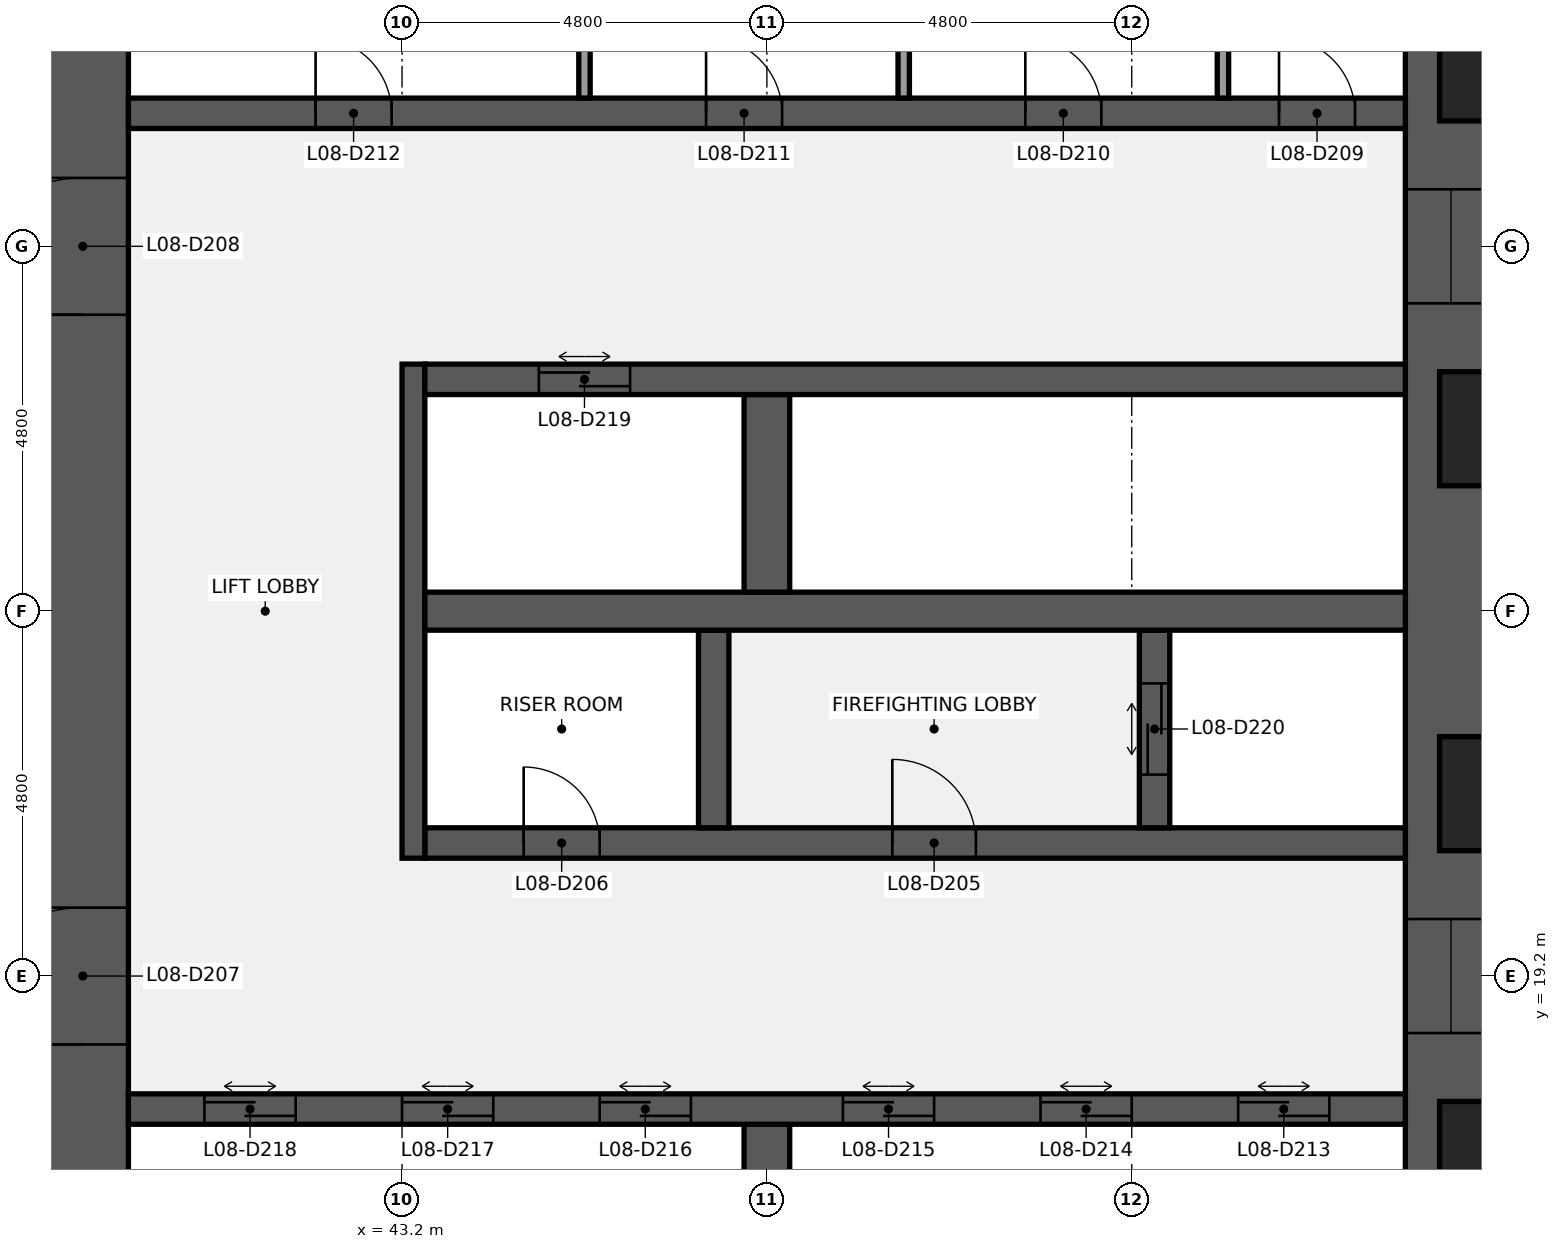
"""IFC4 building model, lengths in metres.
Left out: names, types, materials, properties, quantities, classifications, styles, units other than length and angle.
Written with IfcOpenShell. Run it as: python <this file> out.ifc"""

import sys

from ifc_helpers import new_model, si_unit, direction, frame, frame_2d, origin, place, context, subcontext, project, spatial, rectangle, extrude, element, fill, save


model = new_model("IFC4")
c1 = context("Model", 3, precision=1e-05, world=origin(), true_north=direction((0.0, 1.0)))
c2 = subcontext(c1, "Body", "Model", "MODEL_VIEW")
j1 = project(units=[si_unit("LENGTHUNIT", "METRE"), si_unit("PLANEANGLEUNIT", "RADIAN")], contexts=[c1])
p1 = place(None, origin())
s1 = spatial("IfcSite", under=j1, at=p1, CompositionType="ELEMENT")
p2 = place(p1, origin())
s2 = spatial("IfcBuilding", under=s1, at=p2, CompositionType="ELEMENT")
p3 = place(p2, frame((0.0, 0.0, 43.0)))
s3 = spatial("IfcBuildingStorey", under=s2, at=p3, CompositionType="ELEMENT", Elevation=43.0)
p4 = place(p3, frame((57.0, 38.4, 0.0), z_axis=(0.0, 0.0, 1.0), x_axis=(0.0, -1.0, 0.0)))
e1 = element("IfcWall", 1, at=p4, inside=s3, PredefinedType="SHEAR", context=c2, shape_type="SweptSolid", body=[
    extrude(rectangle(XDim=28.8, YDim=1.2, at=frame_2d((14.4, 0.0))), origin(), (0.0, 0.0, 1.0), 3.84),
])
p5 = place(p4, frame((18.45, 0.0, 0.9)))
e2 = element("IfcOpeningElement", 2, at=p5, cuts=e1, PredefinedType="OPENING", context=c2, shape_type="SweptSolid", body=[
    extrude(rectangle(XDim=1.5, YDim=1.5, at=frame_2d((0.75, 0.75))), frame((0.0, 0.61, 0.0), z_axis=(0.0, -1.0, 0.0), x_axis=(1.0, 0.0, 0.0)), (0.0, 0.0, 1.0), 1.22),
])
p6 = place(p4, frame((8.85, 0.0, 0.9)))
e3 = element("IfcOpeningElement", 3, at=p6, cuts=e1, PredefinedType="OPENING", context=c2, shape_type="SweptSolid", body=[
    extrude(rectangle(XDim=1.5, YDim=1.5, at=frame_2d((0.75, 0.75))), frame((0.0, 0.61, 0.0), z_axis=(0.0, -1.0, 0.0), x_axis=(1.0, 0.0, 0.0)), (0.0, 0.0, 1.0), 1.22),
])
p7 = place(p3, frame((39.0, 9.6, 0.0), z_axis=(0.0, 0.0, 1.0), x_axis=(0.0, 1.0, 0.0)))
e4 = element("IfcWall", 4, at=p7, inside=s3, PredefinedType="SHEAR", context=c2, shape_type="SweptSolid", body=[
    extrude(rectangle(XDim=28.8, YDim=1.2, at=frame_2d((14.4, 0.0))), origin(), (0.0, 0.0, 1.0), 3.84),
])
p8 = place(p7, frame((8.7, 0.0, 0.0)))
e5 = element("IfcOpeningElement", 5, at=p8, cuts=e4, PredefinedType="OPENING", context=c2, shape_type="SweptSolid", body=[
    extrude(rectangle(XDim=1.8, YDim=2.1, at=frame_2d((0.9, 1.05))), frame((0.0, 0.61, 0.0), z_axis=(0.0, -1.0, 0.0), x_axis=(1.0, 0.0, 0.0)), (0.0, 0.0, 1.0), 1.22),
])
p9 = place(p7, frame((18.3, 0.0, 0.0)))
e6 = element("IfcOpeningElement", 6, at=p9, cuts=e4, PredefinedType="OPENING", context=c2, shape_type="SweptSolid", body=[
    extrude(rectangle(XDim=1.8, YDim=2.1, at=frame_2d((0.9, 1.05))), frame((0.0, 0.61, 0.0), z_axis=(0.0, -1.0, 0.0), x_axis=(1.0, 0.0, 0.0)), (0.0, 0.0, 1.0), 1.22),
])
p10 = place(p3, frame((48.0, 14.65, 0.0), z_axis=(0.0, 0.0, 1.0), x_axis=(0.0, 1.0, 0.0)))
e7 = element("IfcWall", 7, at=p10, inside=s3, PredefinedType="SHEAR", context=c2, shape_type="SweptSolid", body=[
    extrude(rectangle(XDim=2.6, YDim=0.6, at=frame_2d((1.3, 0.0))), origin(), (0.0, 0.0, 1.0), 3.84),
])
p11 = place(p3, frame((39.6, 17.45, 0.0), z_axis=(0.0, 0.0, 1.0), x_axis=(1.0, 0.0, 0.0)))
e8 = element("IfcWall", 8, at=p11, inside=s3, PredefinedType="SHEAR", context=c2, shape_type="SweptSolid", body=[
    extrude(rectangle(XDim=16.8, YDim=0.4, at=frame_2d((8.4, 0.0))), origin(), (0.0, 0.0, 1.0), 3.84),
])
p12 = place(p11, frame((14.6, 0.0, 0.0)))
e9 = element("IfcOpeningElement", 9, at=p12, cuts=e8, PredefinedType="OPENING", context=c2, shape_type="SweptSolid", body=[
    extrude(rectangle(XDim=1.2, YDim=2.1, at=frame_2d((0.6, 1.05))), frame((0.0, 0.21, 0.0), z_axis=(0.0, -1.0, 0.0), x_axis=(1.0, 0.0, 0.0)), (0.0, 0.0, 1.0), 0.42),
])
p13 = place(p11, frame((12.0, 0.0, 0.0)))
e10 = element("IfcOpeningElement", 10, at=p13, cuts=e8, PredefinedType="OPENING", context=c2, shape_type="SweptSolid", body=[
    extrude(rectangle(XDim=1.2, YDim=2.1, at=frame_2d((0.6, 1.05))), frame((0.0, 0.21, 0.0), z_axis=(0.0, -1.0, 0.0), x_axis=(1.0, 0.0, 0.0)), (0.0, 0.0, 1.0), 0.42),
])
p14 = place(p11, frame((9.4, 0.0, 0.0)))
e11 = element("IfcOpeningElement", 11, at=p14, cuts=e8, PredefinedType="OPENING", context=c2, shape_type="SweptSolid", body=[
    extrude(rectangle(XDim=1.2, YDim=2.1, at=frame_2d((0.6, 1.05))), frame((0.0, 0.21, 0.0), z_axis=(0.0, -1.0, 0.0), x_axis=(1.0, 0.0, 0.0)), (0.0, 0.0, 1.0), 0.42),
])
p15 = place(p11, frame((6.2, 0.0, 0.0)))
e12 = element("IfcOpeningElement", 12, at=p15, cuts=e8, PredefinedType="OPENING", context=c2, shape_type="SweptSolid", body=[
    extrude(rectangle(XDim=1.2, YDim=2.1, at=frame_2d((0.6, 1.05))), frame((0.0, 0.21, 0.0), z_axis=(0.0, -1.0, 0.0), x_axis=(1.0, 0.0, 0.0)), (0.0, 0.0, 1.0), 0.42),
])
p16 = place(p11, frame((3.6, 0.0, 0.0)))
e13 = element("IfcOpeningElement", 13, at=p16, cuts=e8, PredefinedType="OPENING", context=c2, shape_type="SweptSolid", body=[
    extrude(rectangle(XDim=1.2, YDim=2.1, at=frame_2d((0.6, 1.05))), frame((0.0, 0.21, 0.0), z_axis=(0.0, -1.0, 0.0), x_axis=(1.0, 0.0, 0.0)), (0.0, 0.0, 1.0), 0.42),
])
p17 = place(p11, frame((1.0, 0.0, 0.0)))
e14 = element("IfcOpeningElement", 14, at=p17, cuts=e8, PredefinedType="OPENING", context=c2, shape_type="SweptSolid", body=[
    extrude(rectangle(XDim=1.2, YDim=2.1, at=frame_2d((0.6, 1.05))), frame((0.0, 0.21, 0.0), z_axis=(0.0, -1.0, 0.0), x_axis=(1.0, 0.0, 0.0)), (0.0, 0.0, 1.0), 0.42),
])
p18 = place(p3, frame((43.5, 20.95, 0.0), z_axis=(0.0, 0.0, 1.0), x_axis=(1.0, 0.0, 0.0)))
e15 = element("IfcWall", 15, at=p18, inside=s3, PredefinedType="SHEAR", context=c2, shape_type="SweptSolid", body=[
    extrude(rectangle(XDim=12.9, YDim=0.4, at=frame_2d((6.45, 0.0))), origin(), (0.0, 0.0, 1.0), 3.84),
])
p19 = place(p18, frame((6.15, 0.0, 0.0)))
e16 = element("IfcOpeningElement", 16, at=p19, cuts=e15, PredefinedType="OPENING", context=c2, shape_type="SweptSolid", body=[
    extrude(rectangle(XDim=1.1, YDim=2.1, at=frame_2d((0.55, 1.05))), frame((0.0, 0.21, 0.0), z_axis=(0.0, -1.0, 0.0), x_axis=(1.0, 0.0, 0.0)), (0.0, 0.0, 1.0), 0.42),
])
p20 = place(p18, frame((1.3, 0.0, 0.0)))
e17 = element("IfcOpeningElement", 17, at=p20, cuts=e15, PredefinedType="OPENING", context=c2, shape_type="SweptSolid", body=[
    extrude(rectangle(XDim=1.0, YDim=2.1, at=frame_2d((0.5, 1.05))), frame((0.0, 0.21, 0.0), z_axis=(0.0, -1.0, 0.0), x_axis=(1.0, 0.0, 0.0)), (0.0, 0.0, 1.0), 0.42),
])
p21 = place(p3, frame((43.35, 20.75, 0.0), z_axis=(0.0, 0.0, 1.0), x_axis=(0.0, 1.0, 0.0)))
e18 = element("IfcWall", 18, at=p21, inside=s3, PredefinedType="SHEAR", context=c2, shape_type="SweptSolid", body=[
    extrude(rectangle(XDim=6.5, YDim=0.3, at=frame_2d((3.25, 0.0))), origin(), (0.0, 0.0, 1.0), 3.84),
])
p22 = place(p3, frame((53.1, 21.15, 0.0), z_axis=(0.0, 0.0, 1.0), x_axis=(0.0, 1.0, 0.0)))
e19 = element("IfcWall", 19, at=p22, inside=s3, PredefinedType="SHEAR", context=c2, shape_type="SweptSolid", body=[
    extrude(rectangle(XDim=2.6, YDim=0.4, at=frame_2d((1.3, 0.0))), origin(), (0.0, 0.0, 1.0), 3.84),
])
p23 = place(p22, frame((0.7, 0.0, 0.0)))
e20 = element("IfcOpeningElement", 20, at=p23, cuts=e19, PredefinedType="OPENING", context=c2, shape_type="SweptSolid", body=[
    extrude(rectangle(XDim=1.2, YDim=2.1, at=frame_2d((0.6, 1.05))), frame((0.0, 0.21, 0.0), z_axis=(0.0, -1.0, 0.0), x_axis=(1.0, 0.0, 0.0)), (0.0, 0.0, 1.0), 0.42),
])
p24 = place(p3, frame((47.3, 21.15, 0.0), z_axis=(0.0, 0.0, 1.0), x_axis=(0.0, 1.0, 0.0)))
e21 = element("IfcWall", 21, at=p24, inside=s3, PredefinedType="SHEAR", context=c2, shape_type="SweptSolid", body=[
    extrude(rectangle(XDim=2.6, YDim=0.4, at=frame_2d((1.3, 0.0))), origin(), (0.0, 0.0, 1.0), 3.84),
])
p25 = place(p3, frame((43.5, 24.0, 0.0), z_axis=(0.0, 0.0, 1.0), x_axis=(1.0, 0.0, 0.0)))
e22 = element("IfcWall", 22, at=p25, inside=s3, PredefinedType="SHEAR", context=c2, shape_type="SweptSolid", body=[
    extrude(rectangle(XDim=12.9, YDim=0.5, at=frame_2d((6.45, 0.0))), origin(), (0.0, 0.0, 1.0), 3.84),
])
p26 = place(p3, frame((48.0, 24.25, 0.0), z_axis=(0.0, 0.0, 1.0), x_axis=(0.0, 1.0, 0.0)))
e23 = element("IfcWall", 23, at=p26, inside=s3, PredefinedType="SHEAR", context=c2, shape_type="SweptSolid", body=[
    extrude(rectangle(XDim=2.6, YDim=0.6, at=frame_2d((1.3, 0.0))), origin(), (0.0, 0.0, 1.0), 3.84),
])
p27 = place(p3, frame((43.5, 27.05, 0.0), z_axis=(0.0, 0.0, 1.0), x_axis=(1.0, 0.0, 0.0)))
e24 = element("IfcWall", 24, at=p27, inside=s3, PredefinedType="SHEAR", context=c2, shape_type="SweptSolid", body=[
    extrude(rectangle(XDim=12.9, YDim=0.4, at=frame_2d((6.45, 0.0))), origin(), (0.0, 0.0, 1.0), 3.84),
])
p28 = place(p27, frame((1.5, 0.0, 0.0)))
e25 = element("IfcOpeningElement", 25, at=p28, cuts=e24, PredefinedType="OPENING", context=c2, shape_type="SweptSolid", body=[
    extrude(rectangle(XDim=1.2, YDim=2.1, at=frame_2d((0.6, 1.05))), frame((0.0, 0.21, 0.0), z_axis=(0.0, -1.0, 0.0), x_axis=(1.0, 0.0, 0.0)), (0.0, 0.0, 1.0), 0.42),
])
p29 = place(p3, frame((39.6, 30.55, 0.0), z_axis=(0.0, 0.0, 1.0), x_axis=(1.0, 0.0, 0.0)))
e26 = element("IfcWall", 26, at=p29, inside=s3, PredefinedType="SHEAR", context=c2, shape_type="SweptSolid", body=[
    extrude(rectangle(XDim=16.8, YDim=0.4, at=frame_2d((8.4, 0.0))), origin(), (0.0, 0.0, 1.0), 3.84),
])
p30 = place(p29, frame((15.137, 0.0, 0.0)))
e27 = element("IfcOpeningElement", 27, at=p30, cuts=e26, PredefinedType="OPENING", context=c2, shape_type="SweptSolid", body=[
    extrude(rectangle(XDim=1.0, YDim=2.1, at=frame_2d((0.5, 1.05))), frame((0.0, 0.21, 0.0), z_axis=(0.0, -1.0, 0.0), x_axis=(1.0, 0.0, 0.0)), (0.0, 0.0, 1.0), 0.42),
])
p31 = place(p29, frame((11.8, 0.0, 0.0)))
e28 = element("IfcOpeningElement", 28, at=p31, cuts=e26, PredefinedType="OPENING", context=c2, shape_type="SweptSolid", body=[
    extrude(rectangle(XDim=1.0, YDim=2.1, at=frame_2d((0.5, 1.05))), frame((0.0, 0.21, 0.0), z_axis=(0.0, -1.0, 0.0), x_axis=(1.0, 0.0, 0.0)), (0.0, 0.0, 1.0), 0.42),
])
p32 = place(p29, frame((7.6, 0.0, 0.0)))
e29 = element("IfcOpeningElement", 29, at=p32, cuts=e26, PredefinedType="OPENING", context=c2, shape_type="SweptSolid", body=[
    extrude(rectangle(XDim=1.0, YDim=2.1, at=frame_2d((0.5, 1.05))), frame((0.0, 0.21, 0.0), z_axis=(0.0, -1.0, 0.0), x_axis=(1.0, 0.0, 0.0)), (0.0, 0.0, 1.0), 0.42),
])
p33 = place(p29, frame((2.462, 0.0, 0.0)))
e30 = element("IfcOpeningElement", 30, at=p33, cuts=e26, PredefinedType="OPENING", context=c2, shape_type="SweptSolid", body=[
    extrude(rectangle(XDim=1.0, YDim=2.1, at=frame_2d((0.5, 1.05))), frame((0.0, 0.21, 0.0), z_axis=(0.0, -1.0, 0.0), x_axis=(1.0, 0.0, 0.0)), (0.0, 0.0, 1.0), 0.42),
])
for number, where, z_axis, x_axis in (
    (31, (54.0, 30.75, 0.0), (0.0, 0.0, 1.0), (0.0, 1.0, 0.0)),
    (32, (49.8, 30.75, 0.0), (0.0, 0.0, 1.0), (0.0, 1.0, 0.0)),
    (33, (45.6, 30.75, 0.0), (0.0, 0.0, 1.0), (0.0, 1.0, 0.0)),
):
    element("IfcWall", number, at=place(p3, frame(where, z_axis=z_axis, x_axis=x_axis)), inside=s3, PredefinedType="PARTITIONING", context=c2, shape_type="SweptSolid", body=[
        extrude(rectangle(XDim=2.6, YDim=0.15, at=frame_2d((1.3, 0.0))), origin(), (0.0, 0.0, 1.0), 3.84),
    ])
p34 = place(p19, origin())
e34 = element("IfcDoor", 34, at=p34, inside=s3, OperationType="SINGLE_SWING_LEFT", PredefinedType="DOOR", context=c2, shape_type="SweptSolid", body=[
    extrude(rectangle(XDim=1.1, YDim=2.1, at=frame_2d((0.55, 1.05))), frame((0.0, 0.025, 0.0), z_axis=(0.0, -1.0, 0.0), x_axis=(1.0, 0.0, 0.0)), (0.0, 0.0, 1.0), 0.05),
])
fill(e16, e34)
p35 = place(p20, origin())
e35 = element("IfcDoor", 35, at=p35, inside=s3, OperationType="SINGLE_SWING_LEFT", PredefinedType="DOOR", context=c2, shape_type="SweptSolid", body=[
    extrude(rectangle(XDim=1.0, YDim=2.1, at=frame_2d((0.5, 1.05))), frame((0.0, 0.025, 0.0), z_axis=(0.0, -1.0, 0.0), x_axis=(1.0, 0.0, 0.0)), (0.0, 0.0, 1.0), 0.05),
])
fill(e17, e35)
p36 = place(p8, origin())
e36 = element("IfcDoor", 36, at=p36, inside=s3, OperationType="DOUBLE_DOOR_SINGLE_SWING", PredefinedType="DOOR", context=c2, shape_type="SweptSolid", body=[
    extrude(rectangle(XDim=1.8, YDim=2.1, at=frame_2d((0.9, 1.05))), frame((0.0, 0.025, 0.0), z_axis=(0.0, -1.0, 0.0), x_axis=(1.0, 0.0, 0.0)), (0.0, 0.0, 1.0), 0.05),
])
fill(e5, e36)
p37 = place(p9, origin())
e37 = element("IfcDoor", 37, at=p37, inside=s3, OperationType="DOUBLE_DOOR_SINGLE_SWING", PredefinedType="DOOR", context=c2, shape_type="SweptSolid", body=[
    extrude(rectangle(XDim=1.8, YDim=2.1, at=frame_2d((0.9, 1.05))), frame((0.0, 0.025, 0.0), z_axis=(0.0, -1.0, 0.0), x_axis=(1.0, 0.0, 0.0)), (0.0, 0.0, 1.0), 0.05),
])
fill(e6, e37)
p38 = place(p30, origin())
e38 = element("IfcDoor", 38, at=p38, inside=s3, OperationType="SINGLE_SWING_LEFT", PredefinedType="DOOR", context=c2, shape_type="SweptSolid", body=[
    extrude(rectangle(XDim=1.0, YDim=2.1, at=frame_2d((0.5, 1.05))), frame((0.0, 0.025, 0.0), z_axis=(0.0, -1.0, 0.0), x_axis=(1.0, 0.0, 0.0)), (0.0, 0.0, 1.0), 0.05),
])
fill(e27, e38)
p39 = place(p31, origin())
e39 = element("IfcDoor", 39, at=p39, inside=s3, OperationType="SINGLE_SWING_LEFT", PredefinedType="DOOR", context=c2, shape_type="SweptSolid", body=[
    extrude(rectangle(XDim=1.0, YDim=2.1, at=frame_2d((0.5, 1.05))), frame((0.0, 0.025, 0.0), z_axis=(0.0, -1.0, 0.0), x_axis=(1.0, 0.0, 0.0)), (0.0, 0.0, 1.0), 0.05),
])
fill(e28, e39)
p40 = place(p32, origin())
e40 = element("IfcDoor", 40, at=p40, inside=s3, OperationType="SINGLE_SWING_LEFT", PredefinedType="DOOR", context=c2, shape_type="SweptSolid", body=[
    extrude(rectangle(XDim=1.0, YDim=2.1, at=frame_2d((0.5, 1.05))), frame((0.0, 0.025, 0.0), z_axis=(0.0, -1.0, 0.0), x_axis=(1.0, 0.0, 0.0)), (0.0, 0.0, 1.0), 0.05),
])
fill(e29, e40)
p41 = place(p33, origin())
e41 = element("IfcDoor", 41, at=p41, inside=s3, OperationType="SINGLE_SWING_LEFT", PredefinedType="DOOR", context=c2, shape_type="SweptSolid", body=[
    extrude(rectangle(XDim=1.0, YDim=2.1, at=frame_2d((0.5, 1.05))), frame((0.0, 0.025, 0.0), z_axis=(0.0, -1.0, 0.0), x_axis=(1.0, 0.0, 0.0)), (0.0, 0.0, 1.0), 0.05),
])
fill(e30, e41)
p42 = place(p12, origin())
e42 = element("IfcDoor", 42, at=p42, inside=s3, OperationType="DOUBLE_DOOR_SLIDING", PredefinedType="DOOR", context=c2, shape_type="SweptSolid", body=[
    extrude(rectangle(XDim=1.2, YDim=2.1, at=frame_2d((0.6, 1.05))), frame((0.0, 0.025, 0.0), z_axis=(0.0, -1.0, 0.0), x_axis=(1.0, 0.0, 0.0)), (0.0, 0.0, 1.0), 0.05),
])
fill(e9, e42)
p43 = place(p13, origin())
e43 = element("IfcDoor", 43, at=p43, inside=s3, OperationType="DOUBLE_DOOR_SLIDING", PredefinedType="DOOR", context=c2, shape_type="SweptSolid", body=[
    extrude(rectangle(XDim=1.2, YDim=2.1, at=frame_2d((0.6, 1.05))), frame((0.0, 0.025, 0.0), z_axis=(0.0, -1.0, 0.0), x_axis=(1.0, 0.0, 0.0)), (0.0, 0.0, 1.0), 0.05),
])
fill(e10, e43)
p44 = place(p14, origin())
e44 = element("IfcDoor", 44, at=p44, inside=s3, OperationType="DOUBLE_DOOR_SLIDING", PredefinedType="DOOR", context=c2, shape_type="SweptSolid", body=[
    extrude(rectangle(XDim=1.2, YDim=2.1, at=frame_2d((0.6, 1.05))), frame((0.0, 0.025, 0.0), z_axis=(0.0, -1.0, 0.0), x_axis=(1.0, 0.0, 0.0)), (0.0, 0.0, 1.0), 0.05),
])
fill(e11, e44)
p45 = place(p15, origin())
e45 = element("IfcDoor", 45, at=p45, inside=s3, OperationType="DOUBLE_DOOR_SLIDING", PredefinedType="DOOR", context=c2, shape_type="SweptSolid", body=[
    extrude(rectangle(XDim=1.2, YDim=2.1, at=frame_2d((0.6, 1.05))), frame((0.0, 0.025, 0.0), z_axis=(0.0, -1.0, 0.0), x_axis=(1.0, 0.0, 0.0)), (0.0, 0.0, 1.0), 0.05),
])
fill(e12, e45)
p46 = place(p16, origin())
e46 = element("IfcDoor", 46, at=p46, inside=s3, OperationType="DOUBLE_DOOR_SLIDING", PredefinedType="DOOR", context=c2, shape_type="SweptSolid", body=[
    extrude(rectangle(XDim=1.2, YDim=2.1, at=frame_2d((0.6, 1.05))), frame((0.0, 0.025, 0.0), z_axis=(0.0, -1.0, 0.0), x_axis=(1.0, 0.0, 0.0)), (0.0, 0.0, 1.0), 0.05),
])
fill(e13, e46)
p47 = place(p17, origin())
e47 = element("IfcDoor", 47, at=p47, inside=s3, OperationType="DOUBLE_DOOR_SLIDING", PredefinedType="DOOR", context=c2, shape_type="SweptSolid", body=[
    extrude(rectangle(XDim=1.2, YDim=2.1, at=frame_2d((0.6, 1.05))), frame((0.0, 0.025, 0.0), z_axis=(0.0, -1.0, 0.0), x_axis=(1.0, 0.0, 0.0)), (0.0, 0.0, 1.0), 0.05),
])
fill(e14, e47)
p48 = place(p28, origin())
e48 = element("IfcDoor", 48, at=p48, inside=s3, OperationType="DOUBLE_DOOR_SLIDING", PredefinedType="DOOR", context=c2, shape_type="SweptSolid", body=[
    extrude(rectangle(XDim=1.2, YDim=2.1, at=frame_2d((0.6, 1.05))), frame((0.0, 0.025, 0.0), z_axis=(0.0, -1.0, 0.0), x_axis=(1.0, 0.0, 0.0)), (0.0, 0.0, 1.0), 0.05),
])
fill(e25, e48)
p49 = place(p23, origin())
e49 = element("IfcDoor", 49, at=p49, inside=s3, OperationType="DOUBLE_DOOR_SLIDING", PredefinedType="DOOR", context=c2, shape_type="SweptSolid", body=[
    extrude(rectangle(XDim=1.2, YDim=2.1, at=frame_2d((0.6, 1.05))), frame((0.0, 0.025, 0.0), z_axis=(0.0, -1.0, 0.0), x_axis=(1.0, 0.0, 0.0)), (0.0, 0.0, 1.0), 0.05),
])
fill(e20, e49)
p50 = place(p5, origin())
e50 = element("IfcWindow", 50, at=p50, inside=s3, PartitioningType="SINGLE_PANEL", PredefinedType="WINDOW", context=c2, shape_type="SweptSolid", body=[
    extrude(rectangle(XDim=1.5, YDim=1.5, at=frame_2d((0.75, 0.75))), frame((0.0, 0.03, 0.0), z_axis=(0.0, -1.0, 0.0), x_axis=(1.0, 0.0, 0.0)), (0.0, 0.0, 1.0), 0.06),
])
fill(e2, e50)
p51 = place(p6, origin())
e51 = element("IfcWindow", 51, at=p51, inside=s3, PartitioningType="SINGLE_PANEL", PredefinedType="WINDOW", context=c2, shape_type="SweptSolid", body=[
    extrude(rectangle(XDim=1.5, YDim=1.5, at=frame_2d((0.75, 0.75))), frame((0.0, 0.03, 0.0), z_axis=(0.0, -1.0, 0.0), x_axis=(1.0, 0.0, 0.0)), (0.0, 0.0, 1.0), 0.06),
])
fill(e3, e51)
save(model, sys.argv[1])
